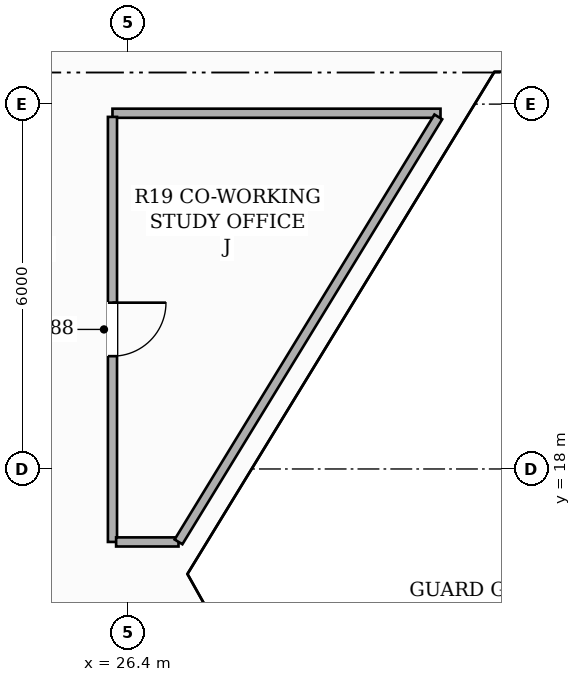
"""IFC4 building model, lengths in metres.
Left out: names, types, materials, properties, quantities, classifications, styles, units other than length and angle.
Written with IfcOpenShell. Run it as: python <this file> out.ifc"""

import sys

from ifc_helpers import new_model, si_unit, direction, frame, frame_2d, origin, place, context, subcontext, project, spatial, rectangle, extrude, element, fill, save


model = new_model("IFC4")
c1 = context("Model", 3, precision=1e-05, world=origin(), true_north=direction((0.0, 1.0)))
c2 = subcontext(c1, "Body", "Model", "MODEL_VIEW")
j1 = project(units=[si_unit("LENGTHUNIT", "METRE"), si_unit("PLANEANGLEUNIT", "RADIAN")], contexts=[c1])
p1 = place(None, origin())
s1 = spatial("IfcSite", under=j1, at=p1, CompositionType="ELEMENT")
p2 = place(p1, origin())
s2 = spatial("IfcBuilding", under=s1, at=p2, CompositionType="ELEMENT")
p3 = place(p2, frame((0.0, 0.0, 33.5)))
s3 = spatial("IfcBuildingStorey", under=s2, at=p3, CompositionType="ELEMENT", Elevation=33.5)
p4 = place(p3, frame((31.545, 23.85, 0.0), z_axis=(0.0, 0.0, 1.0), x_axis=(-1.0, 0.0, 0.0)))
e1 = element("IfcWall", 1, at=p4, inside=s3, PredefinedType="PARTITIONING", context=c2, shape_type="SweptSolid", body=[
    extrude(rectangle(XDim=5.395, YDim=0.15, at=frame_2d((2.698, 0.0))), origin(), (0.0, 0.0, 1.0), 2.669),
])
p5 = place(p3, frame((26.15, 23.79, 0.0), z_axis=(0.0, 0.0, 1.0), x_axis=(0.0, -1.0, 0.0)))
e2 = element("IfcWall", 2, at=p5, inside=s3, PredefinedType="PARTITIONING", context=c2, shape_type="SweptSolid", body=[
    extrude(rectangle(XDim=6.99, YDim=0.15, at=frame_2d((3.495, 0.0))), origin(), (0.0, 0.0, 1.0), 2.669),
])
p6 = place(p5, frame((3.055, 0.0, 0.0)))
e3 = element("IfcOpeningElement", 3, at=p6, cuts=e2, PredefinedType="OPENING", context=c2, shape_type="SweptSolid", body=[
    extrude(rectangle(XDim=0.88, YDim=2.1, at=frame_2d((0.44, 1.05))), frame((0.0, 0.085, 0.0), z_axis=(0.0, -1.0, 0.0), x_axis=(1.0, 0.0, 0.0)), (0.0, 0.0, 1.0), 0.17),
])
p7 = place(p3, frame((26.21, 16.8, 0.0), z_axis=(0.0, 0.0, 1.0), x_axis=(1.0, 0.0, 0.0)))
e4 = element("IfcWall", 4, at=p7, inside=s3, PredefinedType="PARTITIONING", context=c2, shape_type="SweptSolid", body=[
    extrude(rectangle(XDim=1.026, YDim=0.15, at=frame_2d((0.513, 0.0))), origin(), (0.0, 0.0, 1.0), 3.06),
])
p8 = place(p3, frame((27.236, 16.801, 0.0), z_axis=(0.0, 0.0, 1.0), x_axis=(0.521617567684, 0.853179414358, 0.0)))
e5 = element("IfcWall", 5, at=p8, inside=s3, PredefinedType="PARTITIONING", context=c2, shape_type="SweptSolid", body=[
    extrude(rectangle(XDim=8.192, YDim=0.15, at=frame_2d((4.096, 0.0))), origin(), (0.0, 0.0, 1.0), 2.669),
])
p9 = place(p6, origin())
e6 = element("IfcDoor", 6, at=p9, inside=s3, OperationType="SINGLE_SWING_LEFT", PredefinedType="DOOR", context=c2, shape_type="SweptSolid", body=[
    extrude(rectangle(XDim=0.88, YDim=2.1, at=frame_2d((0.44, 1.05))), frame((0.0, 0.025, 0.0), z_axis=(0.0, -1.0, 0.0), x_axis=(1.0, 0.0, 0.0)), (0.0, 0.0, 1.0), 0.05),
])
fill(e3, e6)
save(model, sys.argv[1])
